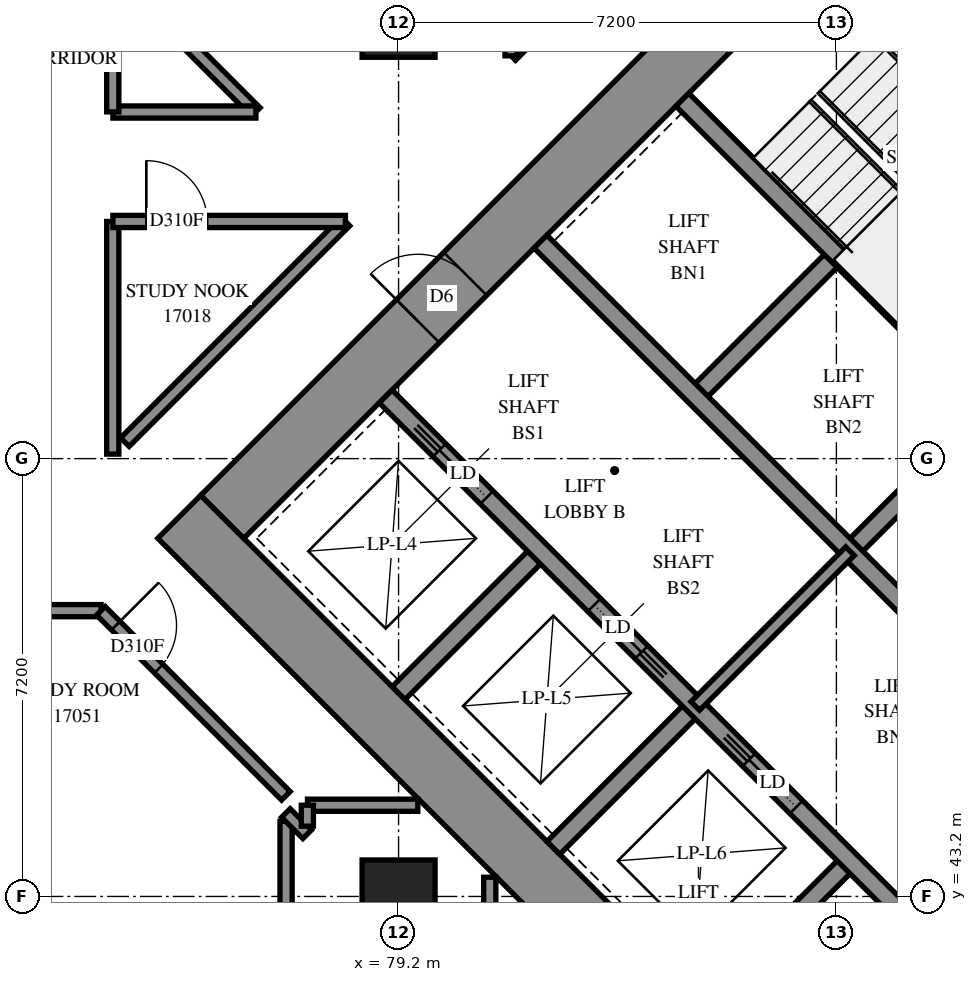
"""IFC4 building model, lengths in metres.
Left out: names, types, materials, properties, quantities, classifications, styles, units other than length and angle.
Written with IfcOpenShell. Run it as: python <this file> out.ifc"""

import sys

from ifc_helpers import new_model, si_unit, direction, frame, frame_2d, origin, origin_2d, place, context, subcontext, project, spatial, rectangle, extrude, element, fill, save


model = new_model("IFC4")
c1 = context("Model", 3, precision=1e-05, world=origin(), true_north=direction((0.0, 1.0)))
c2 = subcontext(c1, "Body", "Model", "MODEL_VIEW")
j1 = project(units=[si_unit("LENGTHUNIT", "METRE"), si_unit("PLANEANGLEUNIT", "RADIAN")], contexts=[c1])
p1 = place(None, origin())
s1 = spatial("IfcSite", under=j1, at=p1, CompositionType="ELEMENT")
p2 = place(p1, origin())
s2 = spatial("IfcBuilding", under=s1, at=p2, CompositionType="ELEMENT")
p3 = place(p2, frame((0.0, 0.0, 64.4)))
s3 = spatial("IfcBuildingStorey", under=s2, at=p3, CompositionType="ELEMENT", Elevation=64.4)
for number, where, z_axis, x_axis in (
    (1, (79.2, 43.2, 0.0), (0.0, 0.0, 1.0), (1.0, 0.0, 0.0)),
    (2, (79.2, 57.6, 0.0), (0.0, 0.0, 1.0), (1.0, 0.0, 0.0)),
):
    element("IfcColumn", number, at=place(p3, frame(where, z_axis=z_axis, x_axis=x_axis)), inside=s3, PredefinedType="COLUMN", context=c2, shape_type="SweptSolid", body=[
        extrude(rectangle(XDim=1.2, YDim=1.2, at=origin_2d()), origin(), (0.0, 0.0, 1.0), 3.1),
    ])
p4 = place(p3, frame((75.594, 49.443, -0.3), z_axis=(0.0, 0.0, 1.0), x_axis=(0.7071037324, -0.70710983, 0.0)))
e3 = element("IfcWall", 3, at=p4, inside=s3, PredefinedType="SHEAR", context=c2, shape_type="SweptSolid", body=[
    extrude(rectangle(XDim=16.4, YDim=1.0, at=frame_2d((8.2, 0.0))), origin(), (0.0, 0.0, 1.0), 2.7),
])
p5 = place(p3, frame((86.483, 60.333, -0.3), z_axis=(0.0, 0.0, 1.0), x_axis=(0.70710983, -0.7071037324, 0.0)))
e4 = element("IfcWall", 4, at=p5, inside=s3, PredefinedType="SHEAR", context=c2, shape_type="SweptSolid", body=[
    extrude(rectangle(XDim=16.4, YDim=1.0, at=frame_2d((8.2, 0.0))), origin(), (0.0, 0.0, 1.0), 2.7),
])
p6 = place(p5, frame((11.0, 0.0, 0.3)))
e5 = element("IfcOpeningElement", 5, at=p6, cuts=e4, PredefinedType="OPENING", context=c2, shape_type="SweptSolid", body=[
    extrude(rectangle(XDim=0.8, YDim=2.1, at=frame_2d((0.4, 1.05))), frame((0.0, 0.51, 0.0), z_axis=(0.0, -1.0, 0.0), x_axis=(1.0, 0.0, 0.0)), (0.0, 0.0, 1.0), 1.02),
])
p7 = place(p3, frame((76.301, 49.443, -0.3), z_axis=(0.0, 0.0, 1.0), x_axis=(0.7071067812, 0.7071067812, 0.0)))
e6 = element("IfcWall", 6, at=p7, inside=s3, PredefinedType="SHEAR", context=c2, shape_type="SweptSolid", body=[
    extrude(rectangle(XDim=14.4, YDim=1.0, at=frame_2d((7.2, 0.0))), origin(), (0.0, 0.0, 1.0), 2.7),
])
p8 = place(p7, frame((4.55, 0.0, 0.3)))
e7 = element("IfcOpeningElement", 7, at=p8, cuts=e6, PredefinedType="OPENING", context=c2, shape_type="SweptSolid", body=[
    extrude(rectangle(XDim=1.1, YDim=2.1, at=frame_2d((0.55, 1.05))), frame((0.0, 0.51, 0.0), z_axis=(0.0, -1.0, 0.0), x_axis=(1.0, 0.0, 0.0)), (0.0, 0.0, 1.0), 1.02),
])
p9 = place(p7, frame((11.35, 0.0, 0.3)))
e8 = element("IfcOpeningElement", 8, at=p9, cuts=e6, PredefinedType="OPENING", context=c2, shape_type="SweptSolid", body=[
    extrude(rectangle(XDim=1.1, YDim=2.1, at=frame_2d((0.55, 1.05))), frame((0.0, 0.51, 0.0), z_axis=(0.0, -1.0, 0.0), x_axis=(1.0, 0.0, 0.0)), (0.0, 0.0, 1.0), 1.02),
])
p10 = place(p3, frame((87.19, 38.554, -0.3), z_axis=(0.0, 0.0, 1.0), x_axis=(0.707103309, 0.7071102534, 0.0)))
e9 = element("IfcWall", 9, at=p10, inside=s3, PredefinedType="SHEAR", context=c2, shape_type="SweptSolid", body=[
    extrude(rectangle(XDim=14.4, YDim=1.0, at=frame_2d((7.2, 0.0))), origin(), (0.0, 0.0, 1.0), 2.7),
])
p11 = place(p10, frame((4.55, 0.0, 0.3)))
e10 = element("IfcOpeningElement", 10, at=p11, cuts=e9, PredefinedType="OPENING", context=c2, shape_type="SweptSolid", body=[
    extrude(rectangle(XDim=1.1, YDim=2.1, at=frame_2d((0.55, 1.05))), frame((0.0, 0.51, 0.0), z_axis=(0.0, -1.0, 0.0), x_axis=(1.0, 0.0, 0.0)), (0.0, 0.0, 1.0), 1.02),
])
p12 = place(p10, frame((11.35, 0.0, 0.3)))
e11 = element("IfcOpeningElement", 11, at=p12, cuts=e9, PredefinedType="OPENING", context=c2, shape_type="SweptSolid", body=[
    extrude(rectangle(XDim=1.1, YDim=2.1, at=frame_2d((0.55, 1.05))), frame((0.0, 0.51, 0.0), z_axis=(0.0, -1.0, 0.0), x_axis=(1.0, 0.0, 0.0)), (0.0, 0.0, 1.0), 1.02),
])
for number, where, z_axis, x_axis in (
    (12, (79.2, 46.544, 0.0), (0.0, 0.0, 1.0), (0.707, 0.707, 0.0)),
    (13, (84.079, 51.423, 0.0), (0.0, 0.0, 1.0), (0.707, 0.707, 0.0)),
):
    element("IfcWall", number, at=place(p3, frame(where, z_axis=z_axis, x_axis=x_axis)), inside=s3, PredefinedType="SOLIDWALL", context=c2, shape_type="SweptSolid", body=[
        extrude(rectangle(XDim=3.3, YDim=0.3, at=frame_2d((1.65, 0.0))), origin(), (0.0, 0.0, 1.0), 3.1),
    ])
p13 = place(p3, frame((81.746, 43.999, 0.0), z_axis=(0.0, 0.0, 1.0), x_axis=(0.7071067812, 0.7071067812, 0.0)))
e14 = element("IfcWall", 14, at=p13, inside=s3, PredefinedType="SOLIDWALL", context=c2, shape_type="SweptSolid", body=[
    extrude(rectangle(XDim=3.3, YDim=0.3, at=frame_2d((1.65, 0.0))), origin(), (0.0, 0.0, 1.0), 3.1),
])
p14 = place(p3, frame((86.625, 48.878, 0.0), z_axis=(0.0, 0.0, 1.0), x_axis=(0.7071067812, 0.7071067812, 0.0)))
e15 = element("IfcWall", 15, at=p14, inside=s3, PredefinedType="SOLIDWALL", context=c2, shape_type="SweptSolid", body=[
    extrude(rectangle(XDim=3.3, YDim=0.3, at=frame_2d((1.65, 0.0))), origin(), (0.0, 0.0, 1.0), 3.1),
])
p15 = place(p3, frame((84.291, 41.453, 0.0), z_axis=(0.0, 0.0, 1.0), x_axis=(0.7071067812, 0.7071067812, 0.0)))
e16 = element("IfcWall", 16, at=p15, inside=s3, PredefinedType="SOLIDWALL", context=c2, shape_type="SweptSolid", body=[
    extrude(rectangle(XDim=3.3, YDim=0.3, at=frame_2d((1.65, 0.0))), origin(), (0.0, 0.0, 1.0), 3.1),
])
p16 = place(p3, frame((78.988, 51.423, 0.0), z_axis=(0.0, 0.0, 1.0), x_axis=(0.7071067812, -0.7071067812, 0.0)))
e17 = element("IfcWall", 17, at=p16, inside=s3, PredefinedType="SOLIDWALL", context=c2, shape_type="SweptSolid", body=[
    extrude(rectangle(XDim=14.4, YDim=0.3, at=frame_2d((7.2, 0.0))), origin(), (0.0, 0.0, 1.0), 3.1),
])
p17 = place(p16, frame((1.25, 0.0, 0.0)))
e18 = element("IfcOpeningElement", 18, at=p17, cuts=e17, PredefinedType="OPENING", context=c2, shape_type="SweptSolid", body=[
    extrude(rectangle(XDim=1.1, YDim=2.1, at=frame_2d((0.55, 1.05))), frame((0.0, 0.16, 0.0), z_axis=(0.0, -1.0, 0.0), x_axis=(1.0, 0.0, 0.0)), (0.0, 0.0, 1.0), 0.32),
])
p18 = place(p16, frame((4.85, 0.0, 0.0)))
e19 = element("IfcOpeningElement", 19, at=p18, cuts=e17, PredefinedType="OPENING", context=c2, shape_type="SweptSolid", body=[
    extrude(rectangle(XDim=1.1, YDim=2.1, at=frame_2d((0.55, 1.05))), frame((0.0, 0.16, 0.0), z_axis=(0.0, -1.0, 0.0), x_axis=(1.0, 0.0, 0.0)), (0.0, 0.0, 1.0), 0.32),
])
p19 = place(p16, frame((8.45, 0.0, 0.0)))
e20 = element("IfcOpeningElement", 20, at=p19, cuts=e17, PredefinedType="OPENING", context=c2, shape_type="SweptSolid", body=[
    extrude(rectangle(XDim=1.1, YDim=2.1, at=frame_2d((0.55, 1.05))), frame((0.0, 0.16, 0.0), z_axis=(0.0, -1.0, 0.0), x_axis=(1.0, 0.0, 0.0)), (0.0, 0.0, 1.0), 0.32),
])
p20 = place(p16, frame((12.05, 0.0, 0.0)))
e21 = element("IfcOpeningElement", 21, at=p20, cuts=e17, PredefinedType="OPENING", context=c2, shape_type="SweptSolid", body=[
    extrude(rectangle(XDim=1.1, YDim=2.1, at=frame_2d((0.55, 1.05))), frame((0.0, 0.16, 0.0), z_axis=(0.0, -1.0, 0.0), x_axis=(1.0, 0.0, 0.0)), (0.0, 0.0, 1.0), 0.32),
])
p21 = place(p3, frame((81.534, 53.969, 0.0), z_axis=(0.0, 0.0, 1.0), x_axis=(0.707103309, -0.7071102534, 0.0)))
e22 = element("IfcWall", 22, at=p21, inside=s3, PredefinedType="SOLIDWALL", context=c2, shape_type="SweptSolid", body=[
    extrude(rectangle(XDim=14.4, YDim=0.3, at=frame_2d((7.2, 0.0))), origin(), (0.0, 0.0, 1.0), 3.1),
])
p22 = place(p21, frame((12.05, 0.0, 0.0)))
e23 = element("IfcOpeningElement", 23, at=p22, cuts=e22, PredefinedType="OPENING", context=c2, shape_type="SweptSolid", body=[
    extrude(rectangle(XDim=1.1, YDim=2.1, at=frame_2d((0.55, 1.05))), frame((0.0, 0.16, 0.0), z_axis=(0.0, -1.0, 0.0), x_axis=(1.0, 0.0, 0.0)), (0.0, 0.0, 1.0), 0.32),
])
p23 = place(p3, frame((83.867, 56.302, 0.0), z_axis=(0.0, 0.0, 1.0), x_axis=(0.7071137256, -0.7070998367, 0.0)))
e24 = element("IfcWall", 24, at=p23, inside=s3, PredefinedType="SOLIDWALL", context=c2, shape_type="SweptSolid", body=[
    extrude(rectangle(XDim=7.2, YDim=0.3, at=frame_2d((3.6, 0.0))), origin(), (0.0, 0.0, 1.0), 3.1),
])
p24 = place(p3, frame((84.079, 46.332, 0.0), z_axis=(0.0, 0.0, 1.0), x_axis=(0.7071067812, 0.7071067812, 0.0)))
e25 = element("IfcWall", 25, at=p24, inside=s3, PredefinedType="PARTITIONING", context=c2, shape_type="SweptSolid", body=[
    extrude(rectangle(XDim=3.6, YDim=0.2, at=frame_2d((1.8, 0.0))), origin(), (0.0, 0.0, 1.0), 3.1),
])
p25 = place(p3, frame((55.1, 47.9, 0.0), z_axis=(0.0, 0.0, 1.0), x_axis=(1.0, 0.0, 0.0)))
e26 = element("IfcWall", 26, at=p25, inside=s3, PredefinedType="PARTITIONING", context=c2, shape_type="SweptSolid", body=[
    extrude(rectangle(XDim=19.208, YDim=0.2, at=frame_2d((9.604, 0.0))), origin(), (0.0, 0.0, 1.0), 3.1),
])
p26 = place(p25, frame((6.399, 0.0, 0.0)))
e27 = element("IfcOpeningElement", 27, at=p26, cuts=e26, PredefinedType="OPENING", context=c2, shape_type="SweptSolid", body=[
    extrude(rectangle(XDim=0.9, YDim=2.1, at=frame_2d((0.45, 1.05))), frame((0.0, 0.11, 0.0), z_axis=(0.0, -1.0, 0.0), x_axis=(1.0, 0.0, 0.0)), (0.0, 0.0, 1.0), 0.22),
])
p27 = place(p25, frame((13.561, 0.0, 0.0)))
e28 = element("IfcOpeningElement", 28, at=p27, cuts=e26, PredefinedType="OPENING", context=c2, shape_type="SweptSolid", body=[
    extrude(rectangle(XDim=0.9, YDim=2.1, at=frame_2d((0.45, 1.05))), frame((0.0, 0.11, 0.0), z_axis=(0.0, -1.0, 0.0), x_axis=(1.0, 0.0, 0.0)), (0.0, 0.0, 1.0), 0.22),
])
p28 = place(p3, frame((86.833, 62.805, 0.0), z_axis=(0.0, 0.0, 1.0), x_axis=(0.7072045138, -0.7070090351, 0.0)))
e29 = element("IfcWall", 29, at=p28, inside=s3, PredefinedType="PARTITIONING", context=c2, shape_type="SweptSolid", body=[
    extrude(rectangle(XDim=13.301, YDim=0.2, at=frame_2d((6.65, 0.0))), origin(), (0.0, 0.0, 1.0), 3.1),
])
p29 = place(p28, frame((10.586, 0.0, 0.0)))
e30 = element("IfcOpeningElement", 30, at=p29, cuts=e29, PredefinedType="OPENING", context=c2, shape_type="SweptSolid", body=[
    extrude(rectangle(XDim=1.0, YDim=2.1, at=frame_2d((0.5, 1.05))), frame((0.0, 0.11, 0.0), z_axis=(0.0, -1.0, 0.0), x_axis=(1.0, 0.0, 0.0)), (0.0, 0.0, 1.0), 0.22),
])
p30 = place(p3, frame((81.053, 57.021, 0.0), z_axis=(0.0, 0.0, 1.0), x_axis=(0.7069845395, 0.7072290017, 0.0)))
e31 = element("IfcWall", 31, at=p30, inside=s3, PredefinedType="PARTITIONING", context=c2, shape_type="SweptSolid", body=[
    extrude(rectangle(XDim=8.181, YDim=0.2, at=frame_2d((4.091, 0.0))), origin(), (0.0, 0.0, 1.0), 3.1),
])
p31 = place(p30, frame((0.86, 0.0, 0.0)))
e32 = element("IfcOpeningElement", 32, at=p31, cuts=e31, PredefinedType="OPENING", context=c2, shape_type="SweptSolid", body=[
    extrude(rectangle(XDim=1.0, YDim=2.1, at=frame_2d((0.5, 1.05))), frame((0.0, 0.11, 0.0), z_axis=(0.0, -1.0, 0.0), x_axis=(1.0, 0.0, 0.0)), (0.0, 0.0, 1.0), 0.22),
])
p32 = place(p3, frame((74.699, 50.671, 0.0), z_axis=(0.0, 0.0, 1.0), x_axis=(0.7071067812, 0.7071067812, 0.0)))
e33 = element("IfcWall", 33, at=p32, inside=s3, PredefinedType="PARTITIONING", context=c2, shape_type="SweptSolid", body=[
    extrude(rectangle(XDim=5.131, YDim=0.2, at=frame_2d((2.565, 0.0))), origin(), (0.0, 0.0, 1.0), 3.1),
])
p33 = place(p3, frame((74.305, 47.897, 0.0), z_axis=(0.0, 0.0, 1.0), x_axis=(0.7071067812, -0.7071067812, 0.0)))
e34 = element("IfcWall", 34, at=p33, inside=s3, PredefinedType="PARTITIONING", context=c2, shape_type="SweptSolid", body=[
    extrude(rectangle(XDim=4.302, YDim=0.2, at=frame_2d((2.151, 0.0))), origin(), (0.0, 0.0, 1.0), 3.1),
])
p34 = place(p33, frame((0.345, 0.0, 0.0)))
e35 = element("IfcOpeningElement", 35, at=p34, cuts=e34, PredefinedType="OPENING", context=c2, shape_type="SweptSolid", body=[
    extrude(rectangle(XDim=1.0, YDim=2.1, at=frame_2d((0.5, 1.05))), frame((0.0, 0.11, 0.0), z_axis=(0.0, -1.0, 0.0), x_axis=(1.0, 0.0, 0.0)), (0.0, 0.0, 1.0), 0.22),
])
p35 = place(p3, frame((74.5, 50.474, 0.0), z_axis=(0.0, 0.0, 1.0), x_axis=(0.0, 1.0, 0.0)))
e36 = element("IfcWall", 36, at=p35, inside=s3, PredefinedType="PARTITIONING", context=c2, shape_type="SweptSolid", body=[
    extrude(rectangle(XDim=3.826, YDim=0.2, at=frame_2d((1.913, 0.0))), origin(), (0.0, 0.0, 1.0), 3.1),
])
p36 = place(p3, frame((74.502, 54.3, 0.0), z_axis=(0.0, 0.0, 1.0), x_axis=(1.0, 0.0, 0.0)))
e37 = element("IfcWall", 37, at=p36, inside=s3, PredefinedType="PARTITIONING", context=c2, shape_type="SweptSolid", body=[
    extrude(rectangle(XDim=3.824, YDim=0.2, at=frame_2d((1.912, 0.0))), origin(), (0.0, 0.0, 1.0), 3.1),
])
p37 = place(p36, frame((0.55, 0.0, 0.0)))
e38 = element("IfcOpeningElement", 38, at=p37, cuts=e37, PredefinedType="OPENING", context=c2, shape_type="SweptSolid", body=[
    extrude(rectangle(XDim=1.0, YDim=2.1, at=frame_2d((0.5, 1.05))), frame((0.0, 0.11, 0.0), z_axis=(0.0, -1.0, 0.0), x_axis=(1.0, 0.0, 0.0)), (0.0, 0.0, 1.0), 0.22),
])
p38 = place(p3, frame((77.35, 40.92, 0.0), z_axis=(0.0, 0.0, 1.0), x_axis=(0.0, 1.0, 0.0)))
e39 = element("IfcWall", 39, at=p38, inside=s3, PredefinedType="PARTITIONING", context=c2, shape_type="SweptSolid", body=[
    extrude(rectangle(XDim=3.516, YDim=0.2, at=frame_2d((1.758, 0.0))), origin(), (0.0, 0.0, 1.0), 3.1),
])
p39 = place(p3, frame((81.05, 57.024, 0.0), z_axis=(0.0, 0.0, 1.0), x_axis=(0.0, 1.0, 0.0)))
e40 = element("IfcWall", 40, at=p39, inside=s3, PredefinedType="PARTITIONING", context=c2, shape_type="SweptSolid", body=[
    extrude(rectangle(XDim=2.426, YDim=0.2, at=frame_2d((1.213, 0.0))), origin(), (0.0, 0.0, 1.0), 3.1),
])
p40 = place(p3, frame((75.168, 57.786, 0.0), z_axis=(0.0, 0.0, 1.0), x_axis=(0.7066870088, -0.7075263045, 0.0)))
e41 = element("IfcWall", 41, at=p40, inside=s3, PredefinedType="PARTITIONING", context=c2, shape_type="SweptSolid", body=[
    extrude(rectangle(XDim=2.383, YDim=0.2, at=frame_2d((1.192, 0.0))), origin(), (0.0, 0.0, 1.0), 3.1),
])
for number, where, z_axis, x_axis in (
    (42, (74.502, 56.1, 0.0), (0.0, 0.0, 1.0), (1.0, 0.0, 0.0)),
    (43, (74.5, 56.102, 0.0), (0.0, 0.0, 1.0), (0.0, 1.0, 0.0)),
):
    element("IfcWall", number, at=place(p3, frame(where, z_axis=z_axis, x_axis=x_axis)), inside=s3, PredefinedType="PARTITIONING", context=c2, shape_type="SweptSolid", body=[
        extrude(rectangle(XDim=2.352, YDim=0.2, at=frame_2d((1.176, 0.0))), origin(), (0.0, 0.0, 1.0), 3.1),
    ])
for number, where, z_axis, x_axis in (
    (44, (77.702, 44.7, 0.0), (0.0, 0.0, 1.0), (1.0, 0.0, 0.0)),
    (45, (80.7, 41.702, 0.0), (0.0, 0.0, 1.0), (0.0, 1.0, 0.0)),
):
    element("IfcWall", number, at=place(p3, frame(where, z_axis=z_axis, x_axis=x_axis)), inside=s3, PredefinedType="PARTITIONING", context=c2, shape_type="SweptSolid", body=[
        extrude(rectangle(XDim=1.814, YDim=0.2, at=frame_2d((0.907, 0.0))), origin(), (0.0, 0.0, 1.0), 3.1),
    ])
p41 = place(p3, frame((77.347, 44.573, 0.0), z_axis=(0.0, 0.0, 1.0), x_axis=(0.7071067812, -0.7071067812, 0.0)))
e46 = element("IfcWall", 46, at=p41, inside=s3, PredefinedType="PARTITIONING", context=c2, shape_type="SweptSolid", body=[
    extrude(rectangle(XDim=0.495, YDim=0.2, at=frame_2d((0.247, 0.0))), origin(), (0.0, 0.0, 1.0), 3.1),
])
p42 = place(p3, frame((77.7, 44.356, 0.0), z_axis=(0.0, 0.0, 1.0), x_axis=(0.0, 1.0, 0.0)))
e47 = element("IfcWall", 47, at=p42, inside=s3, PredefinedType="PARTITIONING", context=c2, shape_type="SweptSolid", body=[
    extrude(rectangle(XDim=0.344, YDim=0.2, at=frame_2d((0.172, 0.0))), origin(), (0.0, 0.0, 1.0), 3.1),
])
p43 = place(p8, origin())
e48 = element("IfcDoor", 48, at=p43, inside=s3, OperationType="DOUBLE_DOOR_SINGLE_SWING", PredefinedType="DOOR", context=c2, shape_type="SweptSolid", body=[
    extrude(rectangle(XDim=1.1, YDim=2.1, at=frame_2d((0.55, 1.05))), frame((0.0, 0.025, 0.0), z_axis=(0.0, -1.0, 0.0), x_axis=(1.0, 0.0, 0.0)), (0.0, 0.0, 1.0), 0.05),
])
fill(e7, e48)
p44 = place(p17, origin())
e49 = element("IfcDoor", 49, at=p44, inside=s3, OperationType="SLIDING_TO_LEFT", PredefinedType="DOOR", context=c2, shape_type="SweptSolid", body=[
    extrude(rectangle(XDim=1.1, YDim=2.1, at=frame_2d((0.55, 1.05))), frame((0.0, 0.025, 0.0), z_axis=(0.0, -1.0, 0.0), x_axis=(1.0, 0.0, 0.0)), (0.0, 0.0, 1.0), 0.05),
])
fill(e18, e49)
p45 = place(p18, origin())
e50 = element("IfcDoor", 50, at=p45, inside=s3, OperationType="SLIDING_TO_RIGHT", PredefinedType="DOOR", context=c2, shape_type="SweptSolid", body=[
    extrude(rectangle(XDim=1.1, YDim=2.1, at=frame_2d((0.55, 1.05))), frame((0.0, 0.025, 0.0), z_axis=(0.0, -1.0, 0.0), x_axis=(1.0, 0.0, 0.0)), (0.0, 0.0, 1.0), 0.05),
])
fill(e19, e50)
p46 = place(p19, origin())
e51 = element("IfcDoor", 51, at=p46, inside=s3, OperationType="SLIDING_TO_LEFT", PredefinedType="DOOR", context=c2, shape_type="SweptSolid", body=[
    extrude(rectangle(XDim=1.1, YDim=2.1, at=frame_2d((0.55, 1.05))), frame((0.0, 0.025, 0.0), z_axis=(0.0, -1.0, 0.0), x_axis=(1.0, 0.0, 0.0)), (0.0, 0.0, 1.0), 0.05),
])
fill(e20, e51)
p47 = place(p37, origin())
e52 = element("IfcDoor", 52, at=p47, inside=s3, OperationType="SINGLE_SWING_RIGHT", PredefinedType="DOOR", context=c2, shape_type="SweptSolid", body=[
    extrude(rectangle(XDim=1.0, YDim=2.1, at=frame_2d((0.5, 1.05))), frame((0.0, 0.025, 0.0), z_axis=(0.0, -1.0, 0.0), x_axis=(1.0, 0.0, 0.0)), (0.0, 0.0, 1.0), 0.05),
])
fill(e38, e52)
p48 = place(p34, origin())
e53 = element("IfcDoor", 53, at=p48, inside=s3, OperationType="SINGLE_SWING_LEFT", PredefinedType="DOOR", context=c2, shape_type="SweptSolid", body=[
    extrude(rectangle(XDim=1.0, YDim=2.1, at=frame_2d((0.5, 1.05))), frame((0.0, 0.025, 0.0), z_axis=(0.0, -1.0, 0.0), x_axis=(1.0, 0.0, 0.0)), (0.0, 0.0, 1.0), 0.05),
])
fill(e35, e53)
save(model, sys.argv[1])
